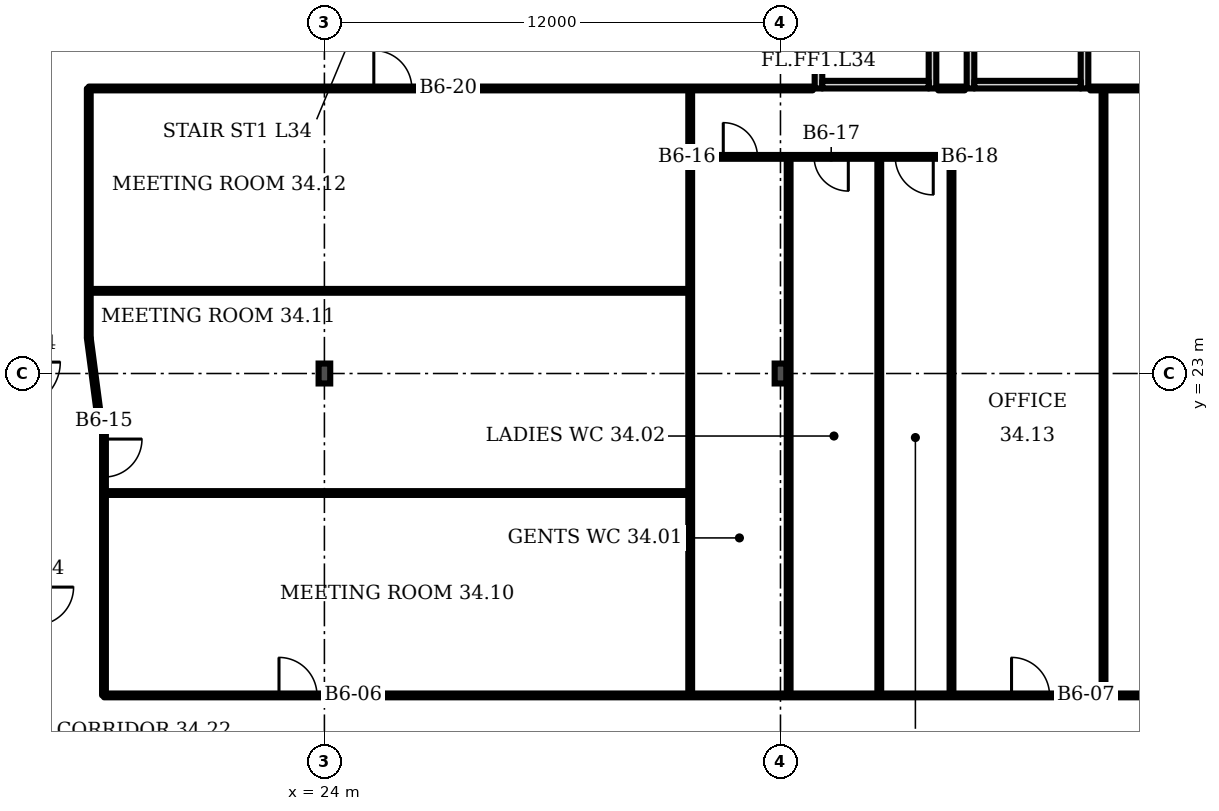
"""IFC4 building model, lengths in metres.
Left out: names, types, materials, properties, quantities, classifications, styles, units other than length and angle.
Written with IfcOpenShell. Run it as: python <this file> out.ifc"""

import sys

from ifc_helpers import new_model, si_unit, direction, frame, frame_2d, origin, origin_2d, place, context, subcontext, project, spatial, rectangle, i_section, extrude, element, fill, save


model = new_model("IFC4")
c1 = context("Model", 3, precision=1e-05, world=origin(), true_north=direction((0.0, 1.0)))
c2 = subcontext(c1, "Body", "Model", "MODEL_VIEW")
j1 = project(units=[si_unit("LENGTHUNIT", "METRE"), si_unit("PLANEANGLEUNIT", "RADIAN")], contexts=[c1])
p1 = place(None, origin())
s1 = spatial("IfcSite", under=j1, at=p1, CompositionType="ELEMENT")
p2 = place(p1, origin())
s2 = spatial("IfcBuilding", under=s1, at=p2, CompositionType="ELEMENT")
p3 = place(p2, frame((0.0, 0.0, 143.5)))
s3 = spatial("IfcBuildingStorey", under=s2, at=p3, CompositionType="ELEMENT", Elevation=143.5)
for number, where, z_axis, x_axis in (
    (1, (24.0, 23.0, 0.0), (0.0, 0.0, 1.0), (1.0, 0.0, 0.0)),
    (2, (36.0, 23.0, 0.0), (0.0, 0.0, 1.0), (1.0, 0.0, 0.0)),
):
    element("IfcColumn", number, at=place(p3, frame(where, z_axis=z_axis, x_axis=x_axis)), inside=s3, PredefinedType="COLUMN", context=c2, shape_type="SweptSolid", body=[
        extrude(i_section(OverallWidth=0.306, OverallDepth=0.524, WebThickness=0.021, FlangeThickness=0.04, FilletRadius=0.027, at=origin_2d()), origin(), (0.0, 0.0, 1.0), 3.6),
    ])
p4 = place(p3, frame((37.0, 30.5, 0.0), z_axis=(0.0, 0.0, 1.0), x_axis=(0.0, 1.0, 0.0)))
e3 = element("IfcWall", 3, at=p4, inside=s3, PredefinedType="PARTITIONING", context=c2, shape_type="SweptSolid", body=[
    extrude(rectangle(XDim=3.5, YDim=0.2, at=frame_2d((1.75, 0.0))), origin(), (0.0, 0.0, 1.0), 3.15),
])
p5 = place(p4, frame((1.2, 0.0, 0.0)))
e4 = element("IfcOpeningElement", 4, at=p5, cuts=e3, PredefinedType="OPENING", context=c2, shape_type="SweptSolid", body=[
    extrude(rectangle(XDim=1.1, YDim=2.1, at=frame_2d((0.55, 1.05))), frame((0.0, 0.11, 0.0), z_axis=(0.0, -1.0, 0.0), x_axis=(1.0, 0.0, 0.0)), (0.0, 0.0, 1.0), 0.22),
])
p6 = place(p3, frame((40.0, 30.5, 0.0), z_axis=(0.0, 0.0, 1.0), x_axis=(0.0, 1.0, 0.0)))
e5 = element("IfcWall", 5, at=p6, inside=s3, PredefinedType="PARTITIONING", context=c2, shape_type="SweptSolid", body=[
    extrude(rectangle(XDim=3.5, YDim=0.2, at=frame_2d((1.75, 0.0))), origin(), (0.0, 0.0, 1.0), 3.15),
])
p7 = place(p3, frame((37.1, 30.6, 0.0), z_axis=(0.0, 0.0, 1.0), x_axis=(1.0, 0.0, 0.0)))
e6 = element("IfcWall", 6, at=p7, inside=s3, PredefinedType="PARTITIONING", context=c2, shape_type="SweptSolid", body=[
    extrude(rectangle(XDim=2.8, YDim=0.2, at=frame_2d((1.4, 0.0))), origin(), (0.0, 0.0, 1.0), 3.15),
])
p8 = place(p3, frame((41.0, 30.5, 0.0), z_axis=(0.0, 0.0, 1.0), x_axis=(0.0, 1.0, 0.0)))
e7 = element("IfcWall", 7, at=p8, inside=s3, PredefinedType="PARTITIONING", context=c2, shape_type="SweptSolid", body=[
    extrude(rectangle(XDim=3.5, YDim=0.2, at=frame_2d((1.75, 0.0))), origin(), (0.0, 0.0, 1.0), 3.15),
])
p9 = place(p3, frame((44.0, 30.5, 0.0), z_axis=(0.0, 0.0, 1.0), x_axis=(0.0, 1.0, 0.0)))
e8 = element("IfcWall", 8, at=p9, inside=s3, PredefinedType="PARTITIONING", context=c2, shape_type="SweptSolid", body=[
    extrude(rectangle(XDim=3.5, YDim=0.2, at=frame_2d((1.75, 0.0))), origin(), (0.0, 0.0, 1.0), 3.15),
])
p10 = place(p9, frame((1.2, 0.0, 0.0)))
e9 = element("IfcOpeningElement", 9, at=p10, cuts=e8, PredefinedType="OPENING", context=c2, shape_type="SweptSolid", body=[
    extrude(rectangle(XDim=1.1, YDim=2.1, at=frame_2d((0.55, 1.05))), frame((0.0, 0.11, 0.0), z_axis=(0.0, -1.0, 0.0), x_axis=(1.0, 0.0, 0.0)), (0.0, 0.0, 1.0), 0.22),
])
p11 = place(p3, frame((41.1, 30.6, 0.0), z_axis=(0.0, 0.0, 1.0), x_axis=(1.0, 0.0, 0.0)))
e10 = element("IfcWall", 10, at=p11, inside=s3, PredefinedType="PARTITIONING", context=c2, shape_type="SweptSolid", body=[
    extrude(rectangle(XDim=2.8, YDim=0.2, at=frame_2d((1.4, 0.0))), origin(), (0.0, 0.0, 1.0), 3.15),
])
p12 = place(p3, frame((17.8, 23.935, 0.0), z_axis=(0.0, 0.0, 1.0), x_axis=(0.0, 1.0, 0.0)))
e11 = element("IfcWall", 11, at=p12, inside=s3, PredefinedType="PARTITIONING", context=c2, shape_type="SweptSolid", body=[
    extrude(rectangle(XDim=6.565, YDim=0.1, at=frame_2d((3.282, 0.0))), origin(), (0.0, 0.0, 1.0), 3.15),
])
p13 = place(p3, frame((17.8, 25.175, 0.0), z_axis=(0.0, 0.0, 1.0), x_axis=(1.0, 0.0, 0.0)))
e12 = element("IfcWall", 12, at=p13, inside=s3, PredefinedType="PARTITIONING", context=c2, shape_type="SweptSolid", body=[
    extrude(rectangle(XDim=15.825, YDim=0.1, at=frame_2d((7.913, 0.0))), origin(), (0.0, 0.0, 1.0), 3.15),
])
p14 = place(p3, frame((17.8, 30.5, 0.0), z_axis=(0.0, 0.0, 1.0), x_axis=(1.0, 0.0, 0.0)))
e13 = element("IfcWall", 13, at=p14, inside=s3, PredefinedType="PARTITIONING", context=c2, shape_type="SweptSolid", body=[
    extrude(rectangle(XDim=19.05, YDim=0.1, at=frame_2d((9.525, 0.0))), origin(), (0.0, 0.0, 1.0), 3.15),
])
p15 = place(p14, frame((7.5, 0.0, 0.0)))
e14 = element("IfcOpeningElement", 14, at=p15, cuts=e13, PredefinedType="OPENING", context=c2, shape_type="SweptSolid", body=[
    extrude(rectangle(XDim=1.0, YDim=2.1, at=frame_2d((0.5, 1.05))), frame((0.0, 0.06, 0.0), z_axis=(0.0, -1.0, 0.0), x_axis=(1.0, 0.0, 0.0)), (0.0, 0.0, 1.0), 0.12),
])
p16 = place(p3, frame((18.1, 21.66, 0.0), z_axis=(0.0, 0.0, 1.0), x_axis=(-0.130749, 0.991416, 0.0)))
e15 = element("IfcWall", 15, at=p16, inside=s3, PredefinedType="PARTITIONING", context=c2, shape_type="SweptSolid", body=[
    extrude(rectangle(XDim=2.295, YDim=0.1, at=frame_2d((1.147, 0.0))), origin(), (0.0, 0.0, 1.0), 3.15),
])
p17 = place(p3, frame((18.2, 14.53, 0.0), z_axis=(0.0, 0.0, 1.0), x_axis=(0.0, 1.0, 0.0)))
e16 = element("IfcWall", 16, at=p17, inside=s3, PredefinedType="PARTITIONING", context=c2, shape_type="SweptSolid", body=[
    extrude(rectangle(XDim=7.02, YDim=0.1, at=frame_2d((3.51, 0.0))), origin(), (0.0, 0.0, 1.0), 3.15),
])
p18 = place(p17, frame((5.745, 0.0, 0.0)))
e17 = element("IfcOpeningElement", 17, at=p18, cuts=e16, PredefinedType="OPENING", context=c2, shape_type="SweptSolid", body=[
    extrude(rectangle(XDim=1.0, YDim=2.1, at=frame_2d((0.5, 1.05))), frame((0.0, 0.06, 0.0), z_axis=(0.0, -1.0, 0.0), x_axis=(1.0, 0.0, 0.0)), (0.0, 0.0, 1.0), 0.12),
])
p19 = place(p3, frame((18.2, 14.53, 0.0), z_axis=(0.0, 0.0, 1.0), x_axis=(1.0, 0.0, 0.0)))
e18 = element("IfcWall", 18, at=p19, inside=s3, PredefinedType="PARTITIONING", context=c2, shape_type="SweptSolid", body=[
    extrude(rectangle(XDim=68.41, YDim=0.1, at=frame_2d((34.205, 0.0))), origin(), (0.0, 0.0, 1.0), 3.15),
])
p20 = place(p19, frame((4.605, 0.0, 0.0)))
e19 = element("IfcOpeningElement", 19, at=p20, cuts=e18, PredefinedType="OPENING", context=c2, shape_type="SweptSolid", body=[
    extrude(rectangle(XDim=1.0, YDim=2.1, at=frame_2d((0.5, 1.05))), frame((0.0, 0.06, 0.0), z_axis=(0.0, -1.0, 0.0), x_axis=(1.0, 0.0, 0.0)), (0.0, 0.0, 1.0), 0.12),
])
p21 = place(p19, frame((23.88, 0.0, 0.0)))
e20 = element("IfcOpeningElement", 20, at=p21, cuts=e18, PredefinedType="OPENING", context=c2, shape_type="SweptSolid", body=[
    extrude(rectangle(XDim=1.0, YDim=2.1, at=frame_2d((0.5, 1.05))), frame((0.0, 0.06, 0.0), z_axis=(0.0, -1.0, 0.0), x_axis=(1.0, 0.0, 0.0)), (0.0, 0.0, 1.0), 0.12),
])
p22 = place(p19, frame((27.8, 0.0, 0.0)))
e21 = element("IfcOpeningElement", 21, at=p22, cuts=e18, PredefinedType="OPENING", context=c2, shape_type="SweptSolid", body=[
    extrude(rectangle(XDim=1.0, YDim=2.1, at=frame_2d((0.5, 1.05))), frame((0.0, 0.06, 0.0), z_axis=(0.0, -1.0, 0.0), x_axis=(1.0, 0.0, 0.0)), (0.0, 0.0, 1.0), 0.12),
])
p23 = place(p19, frame((31.8, 0.0, 0.0)))
e22 = element("IfcOpeningElement", 22, at=p23, cuts=e18, PredefinedType="OPENING", context=c2, shape_type="SweptSolid", body=[
    extrude(rectangle(XDim=1.0, YDim=2.1, at=frame_2d((0.5, 1.05))), frame((0.0, 0.06, 0.0), z_axis=(0.0, -1.0, 0.0), x_axis=(1.0, 0.0, 0.0)), (0.0, 0.0, 1.0), 0.12),
])
p24 = place(p19, frame((35.8, 0.0, 0.0)))
e23 = element("IfcOpeningElement", 23, at=p24, cuts=e18, PredefinedType="OPENING", context=c2, shape_type="SweptSolid", body=[
    extrude(rectangle(XDim=1.0, YDim=2.1, at=frame_2d((0.5, 1.05))), frame((0.0, 0.06, 0.0), z_axis=(0.0, -1.0, 0.0), x_axis=(1.0, 0.0, 0.0)), (0.0, 0.0, 1.0), 0.12),
])
p25 = place(p19, frame((41.355, 0.0, 0.0)))
e24 = element("IfcOpeningElement", 24, at=p25, cuts=e18, PredefinedType="OPENING", context=c2, shape_type="SweptSolid", body=[
    extrude(rectangle(XDim=1.0, YDim=2.1, at=frame_2d((0.5, 1.05))), frame((0.0, 0.06, 0.0), z_axis=(0.0, -1.0, 0.0), x_axis=(1.0, 0.0, 0.0)), (0.0, 0.0, 1.0), 0.12),
])
p26 = place(p19, frame((50.88, 0.0, 0.0)))
e25 = element("IfcOpeningElement", 25, at=p26, cuts=e18, PredefinedType="OPENING", context=c2, shape_type="SweptSolid", body=[
    extrude(rectangle(XDim=1.8, YDim=2.1, at=frame_2d((0.9, 1.05))), frame((0.0, 0.06, 0.0), z_axis=(0.0, -1.0, 0.0), x_axis=(1.0, 0.0, 0.0)), (0.0, 0.0, 1.0), 0.12),
])
p27 = place(p19, frame((62.796, 0.0, 0.0)))
e26 = element("IfcOpeningElement", 26, at=p27, cuts=e18, PredefinedType="OPENING", context=c2, shape_type="SweptSolid", body=[
    extrude(rectangle(XDim=1.0, YDim=2.1, at=frame_2d((0.5, 1.05))), frame((0.0, 0.06, 0.0), z_axis=(0.0, -1.0, 0.0), x_axis=(1.0, 0.0, 0.0)), (0.0, 0.0, 1.0), 0.12),
])
p28 = place(p3, frame((18.2, 19.855, 0.0), z_axis=(0.0, 0.0, 1.0), x_axis=(1.0, 0.0, 0.0)))
e27 = element("IfcWall", 27, at=p28, inside=s3, PredefinedType="PARTITIONING", context=c2, shape_type="SweptSolid", body=[
    extrude(rectangle(XDim=15.425, YDim=0.1, at=frame_2d((7.712, 0.0))), origin(), (0.0, 0.0, 1.0), 3.15),
])
p29 = place(p3, frame((18.2, 21.55, 0.0), z_axis=(0.0, 0.0, 1.0), x_axis=(-0.672587, 0.74001, 0.0)))
e28 = element("IfcWall", 28, at=p29, inside=s3, PredefinedType="PARTITIONING", context=c2, shape_type="SweptSolid", body=[
    extrude(rectangle(XDim=0.148, YDim=0.1, at=frame_2d((0.074, 0.0))), origin(), (0.0, 0.0, 1.0), 3.15),
])
p30 = place(p3, frame((33.625, 14.53, 0.0), z_axis=(0.0, 0.0, 1.0), x_axis=(0.0, 1.0, 0.0)))
e29 = element("IfcWall", 29, at=p30, inside=s3, PredefinedType="PARTITIONING", context=c2, shape_type="SweptSolid", body=[
    extrude(rectangle(XDim=15.96, YDim=0.1, at=frame_2d((7.98, 0.0))), origin(), (0.0, 0.0, 1.0), 3.15),
])
p31 = place(p3, frame((33.625, 28.7, 0.0), z_axis=(0.0, 0.0, 1.0), x_axis=(1.0, 0.0, 0.0)))
e30 = element("IfcWall", 30, at=p31, inside=s3, PredefinedType="PARTITIONING", context=c2, shape_type="SweptSolid", body=[
    extrude(rectangle(XDim=6.875, YDim=0.1, at=frame_2d((3.438, 0.0))), origin(), (0.0, 0.0, 1.0), 3.15),
])
p32 = place(p31, frame((0.87, 0.0, 0.0)))
e31 = element("IfcOpeningElement", 31, at=p32, cuts=e30, PredefinedType="OPENING", context=c2, shape_type="SweptSolid", body=[
    extrude(rectangle(XDim=0.9, YDim=2.1, at=frame_2d((0.45, 1.05))), frame((0.0, 0.06, 0.0), z_axis=(0.0, -1.0, 0.0), x_axis=(1.0, 0.0, 0.0)), (0.0, 0.0, 1.0), 0.12),
])
p33 = place(p31, frame((3.26, 0.0, 0.0)))
e32 = element("IfcOpeningElement", 32, at=p33, cuts=e30, PredefinedType="OPENING", context=c2, shape_type="SweptSolid", body=[
    extrude(rectangle(XDim=0.9, YDim=2.1, at=frame_2d((0.45, 1.05))), frame((0.0, 0.06, 0.0), z_axis=(0.0, -1.0, 0.0), x_axis=(1.0, 0.0, 0.0)), (0.0, 0.0, 1.0), 0.12),
])
p34 = place(p31, frame((5.395, 0.0, 0.0)))
e33 = element("IfcOpeningElement", 33, at=p34, cuts=e30, PredefinedType="OPENING", context=c2, shape_type="SweptSolid", body=[
    extrude(rectangle(XDim=1.0, YDim=2.1, at=frame_2d((0.5, 1.05))), frame((0.0, 0.06, 0.0), z_axis=(0.0, -1.0, 0.0), x_axis=(1.0, 0.0, 0.0)), (0.0, 0.0, 1.0), 0.12),
])
for number, where, z_axis, x_axis in (
    (34, (36.215, 14.53, 0.0), (0.0, 0.0, 1.0), (0.0, 1.0, 0.0)),
    (35, (38.6, 14.53, 0.0), (0.0, 0.0, 1.0), (0.0, 1.0, 0.0)),
    (36, (40.5, 14.53, 0.0), (0.0, 0.0, 1.0), (0.0, 1.0, 0.0)),
):
    element("IfcWall", number, at=place(p3, frame(where, z_axis=z_axis, x_axis=x_axis)), inside=s3, PredefinedType="PARTITIONING", context=c2, shape_type="SweptSolid", body=[
        extrude(rectangle(XDim=14.17, YDim=0.1, at=frame_2d((7.085, 0.0))), origin(), (0.0, 0.0, 1.0), 3.15),
    ])
p35 = place(p3, frame((44.5, 14.53, 0.0), z_axis=(0.0, 0.0, 1.0), x_axis=(0.0, 1.0, 0.0)))
e37 = element("IfcWall", 37, at=p35, inside=s3, PredefinedType="PARTITIONING", context=c2, shape_type="SweptSolid", body=[
    extrude(rectangle(XDim=15.97, YDim=0.1, at=frame_2d((7.985, 0.0))), origin(), (0.0, 0.0, 1.0), 3.15),
])
p36 = place(p3, frame((40.15, 30.5, 0.0), z_axis=(0.0, 0.0, 1.0), x_axis=(1.0, 0.0, 0.0)))
e38 = element("IfcWall", 38, at=p36, inside=s3, PredefinedType="PARTITIONING", context=c2, shape_type="SweptSolid", body=[
    extrude(rectangle(XDim=0.7, YDim=0.1, at=frame_2d((0.35, 0.0))), origin(), (0.0, 0.0, 1.0), 3.15),
])
p37 = place(p3, frame((44.15, 30.5, 0.0), z_axis=(0.0, 0.0, 1.0), x_axis=(1.0, 0.0, 0.0)))
e39 = element("IfcWall", 39, at=p37, inside=s3, PredefinedType="PARTITIONING", context=c2, shape_type="SweptSolid", body=[
    extrude(rectangle(XDim=19.425, YDim=0.1, at=frame_2d((9.712, 0.0))), origin(), (0.0, 0.0, 1.0), 3.15),
])
p38 = place(p20, origin())
e40 = element("IfcDoor", 40, at=p38, inside=s3, OperationType="SINGLE_SWING_LEFT", PredefinedType="DOOR", context=c2, shape_type="SweptSolid", body=[
    extrude(rectangle(XDim=1.0, YDim=2.1, at=frame_2d((0.5, 1.05))), frame((0.0, 0.025, 0.0), z_axis=(0.0, -1.0, 0.0), x_axis=(1.0, 0.0, 0.0)), (0.0, 0.0, 1.0), 0.05),
])
fill(e19, e40)
p39 = place(p21, origin())
e41 = element("IfcDoor", 41, at=p39, inside=s3, OperationType="SINGLE_SWING_LEFT", PredefinedType="DOOR", context=c2, shape_type="SweptSolid", body=[
    extrude(rectangle(XDim=1.0, YDim=2.1, at=frame_2d((0.5, 1.05))), frame((0.0, 0.025, 0.0), z_axis=(0.0, -1.0, 0.0), x_axis=(1.0, 0.0, 0.0)), (0.0, 0.0, 1.0), 0.05),
])
fill(e20, e41)
p40 = place(p18, origin())
e42 = element("IfcDoor", 42, at=p40, inside=s3, OperationType="SINGLE_SWING_RIGHT", PredefinedType="DOOR", context=c2, shape_type="SweptSolid", body=[
    extrude(rectangle(XDim=1.0, YDim=2.1, at=frame_2d((0.5, 1.05))), frame((0.0, 0.025, 0.0), z_axis=(0.0, -1.0, 0.0), x_axis=(1.0, 0.0, 0.0)), (0.0, 0.0, 1.0), 0.05),
])
fill(e17, e42)
p41 = place(p32, origin())
e43 = element("IfcDoor", 43, at=p41, inside=s3, OperationType="SINGLE_SWING_LEFT", PredefinedType="DOOR", context=c2, shape_type="SweptSolid", body=[
    extrude(rectangle(XDim=0.9, YDim=2.1, at=frame_2d((0.45, 1.05))), frame((0.0, 0.025, 0.0), z_axis=(0.0, -1.0, 0.0), x_axis=(1.0, 0.0, 0.0)), (0.0, 0.0, 1.0), 0.05),
])
fill(e31, e43)
p42 = place(p33, origin())
e44 = element("IfcDoor", 44, at=p42, inside=s3, OperationType="SINGLE_SWING_RIGHT", PredefinedType="DOOR", context=c2, shape_type="SweptSolid", body=[
    extrude(rectangle(XDim=0.9, YDim=2.1, at=frame_2d((0.45, 1.05))), frame((0.0, 0.025, 0.0), z_axis=(0.0, -1.0, 0.0), x_axis=(1.0, 0.0, 0.0)), (0.0, 0.0, 1.0), 0.05),
])
fill(e32, e44)
p43 = place(p34, origin())
e45 = element("IfcDoor", 45, at=p43, inside=s3, OperationType="SINGLE_SWING_RIGHT", PredefinedType="DOOR", context=c2, shape_type="SweptSolid", body=[
    extrude(rectangle(XDim=1.0, YDim=2.1, at=frame_2d((0.5, 1.05))), frame((0.0, 0.025, 0.0), z_axis=(0.0, -1.0, 0.0), x_axis=(1.0, 0.0, 0.0)), (0.0, 0.0, 1.0), 0.05),
])
fill(e33, e45)
p44 = place(p15, origin())
e46 = element("IfcDoor", 46, at=p44, inside=s3, OperationType="SINGLE_SWING_LEFT", PredefinedType="DOOR", context=c2, shape_type="SweptSolid", body=[
    extrude(rectangle(XDim=1.0, YDim=2.1, at=frame_2d((0.5, 1.05))), frame((0.0, 0.025, 0.0), z_axis=(0.0, -1.0, 0.0), x_axis=(1.0, 0.0, 0.0)), (0.0, 0.0, 1.0), 0.05),
])
fill(e14, e46)
save(model, sys.argv[1])
